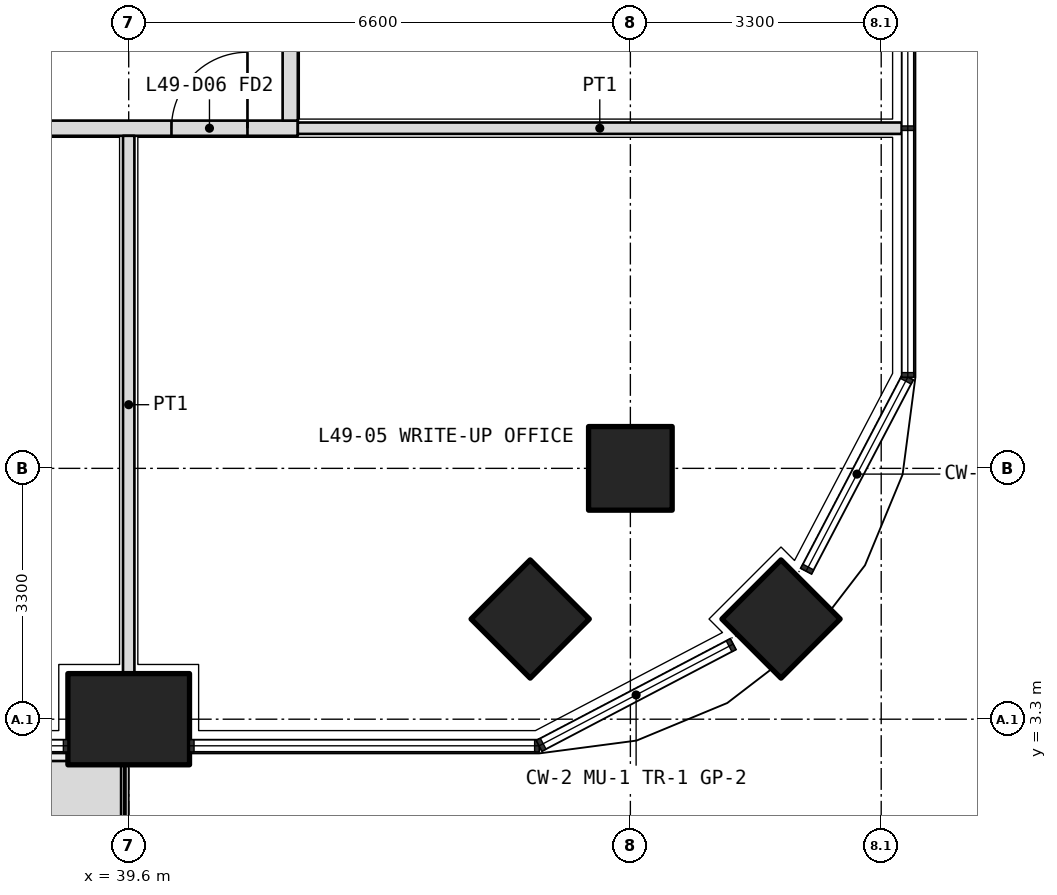
"""IFC4 building model, lengths in metres.
Left out: names, types, materials, properties, quantities, classifications, styles, units other than length and angle.
Written with IfcOpenShell. Run it as: python <this file> out.ifc"""

import sys

from ifc_helpers import new_model, si_unit, direction, frame, frame_2d, origin, origin_2d, place, context, subcontext, project, spatial, polyline, rectangle, outline, extrude, element, fill, save


model = new_model("IFC4")
c1 = context("Model", 3, precision=1e-05, world=origin(), true_north=direction((0.0, 1.0)))
c2 = subcontext(c1, "Body", "Model", "MODEL_VIEW")
j1 = project(units=[si_unit("LENGTHUNIT", "METRE"), si_unit("PLANEANGLEUNIT", "RADIAN")], contexts=[c1])
p1 = place(None, origin())
s1 = spatial("IfcSite", under=j1, at=p1, CompositionType="ELEMENT")
p2 = place(p1, origin())
s2 = spatial("IfcBuilding", under=s1, at=p2, CompositionType="ELEMENT")
p3 = place(p2, frame((0.0, 0.0, 214.5)))
s3 = spatial("IfcBuildingStorey", under=s2, at=p3, CompositionType="ELEMENT", Elevation=214.5)
p4 = place(p3, frame((48.182, 4.618, 0.0), z_axis=(0.0, 0.0, 1.0), x_axis=(0.707106781187, 0.707106781187, 0.0)))
e1 = element("IfcColumn", 1, at=p4, inside=s3, PredefinedType="COLUMN", context=c2, shape_type="SweptSolid", body=[
    extrude(rectangle(XDim=1.1, YDim=1.1, at=origin_2d()), origin(), (0.0, 0.0, 1.0), 4.2),
])
p5 = place(p3, frame((39.6, 3.3, 0.0), z_axis=(0.0, 0.0, 1.0), x_axis=(1.0, 0.0, 0.0)))
e2 = element("IfcColumn", 2, at=p5, inside=s3, PredefinedType="COLUMN", context=c2, shape_type="SweptSolid", body=[
    extrude(rectangle(XDim=1.6, YDim=1.2, at=origin_2d()), origin(), (0.0, 0.0, 1.0), 4.2),
])
for number, where, z_axis, x_axis in (
    (3, (46.2, 6.6, 0.0), (0.0, 0.0, 1.0), (1.0, 0.0, 0.0)),
    (4, (44.882, 4.618, 0.0), (0.0, 0.0, 1.0), (0.707, 0.707, 0.0)),
):
    element("IfcColumn", number, at=place(p3, frame(where, z_axis=z_axis, x_axis=x_axis)), inside=s3, PredefinedType="COLUMN", context=c2, shape_type="SweptSolid", body=[
        extrude(rectangle(XDim=1.1, YDim=1.1, at=origin_2d()), origin(), (0.0, 0.0, 1.0), 4.2),
    ])
p6 = place(p3, origin())
e5 = element("IfcWall", 5, at=p6, inside=s3, PredefinedType="USERDEFINED", context=c2, shape_type="SweptSolid", body=[
    extrude(outline(polyline([(30.45, 1.75), (39.5, 1.75), (39.5, 2.75), (30.45, 2.75), (30.45, 1.75)]), holes=[polyline([(30.6, 1.9), (39.35, 1.9), (39.35, 2.6), (30.6, 2.6), (30.6, 1.9)])]), origin(), (0.0, 0.0, 1.0), 1.05),
])
p7 = place(p3, frame((10.975, 11.075, 0.0), z_axis=(0.0, 0.0, 1.0), x_axis=(1.0, 0.0, 0.0)))
e6 = element("IfcWall", 6, at=p7, inside=s3, PredefinedType="PARTITIONING", context=c2, shape_type="SweptSolid", body=[
    extrude(rectangle(XDim=30.85, YDim=0.2, at=frame_2d((15.425, 0.0))), origin(), (0.0, 0.0, 1.0), 2.85),
])
p8 = place(p7, frame((2.312, 0.0, 0.0)))
e7 = element("IfcOpeningElement", 7, at=p8, cuts=e6, PredefinedType="OPENING", context=c2, shape_type="SweptSolid", body=[
    extrude(rectangle(XDim=1.0, YDim=2.1, at=frame_2d((0.5, 1.05))), frame((0.0, 0.11, 0.0), z_axis=(0.0, -1.0, 0.0), x_axis=(1.0, 0.0, 0.0)), (0.0, 0.0, 1.0), 0.22),
])
p9 = place(p7, frame((9.975, 0.0, 0.0)))
e8 = element("IfcOpeningElement", 8, at=p9, cuts=e6, PredefinedType="OPENING", context=c2, shape_type="SweptSolid", body=[
    extrude(rectangle(XDim=1.0, YDim=2.1, at=frame_2d((0.5, 1.05))), frame((0.0, 0.11, 0.0), z_axis=(0.0, -1.0, 0.0), x_axis=(1.0, 0.0, 0.0)), (0.0, 0.0, 1.0), 0.22),
])
p10 = place(p7, frame((16.575, 0.0, 0.0)))
e9 = element("IfcOpeningElement", 9, at=p10, cuts=e6, PredefinedType="OPENING", context=c2, shape_type="SweptSolid", body=[
    extrude(rectangle(XDim=1.0, YDim=2.1, at=frame_2d((0.5, 1.05))), frame((0.0, 0.11, 0.0), z_axis=(0.0, -1.0, 0.0), x_axis=(1.0, 0.0, 0.0)), (0.0, 0.0, 1.0), 0.22),
])
p11 = place(p7, frame((23.175, 0.0, 0.0)))
e10 = element("IfcOpeningElement", 10, at=p11, cuts=e6, PredefinedType="OPENING", context=c2, shape_type="SweptSolid", body=[
    extrude(rectangle(XDim=1.0, YDim=2.1, at=frame_2d((0.5, 1.05))), frame((0.0, 0.11, 0.0), z_axis=(0.0, -1.0, 0.0), x_axis=(1.0, 0.0, 0.0)), (0.0, 0.0, 1.0), 0.22),
])
p12 = place(p7, frame((29.188, 0.0, 0.0)))
e11 = element("IfcOpeningElement", 11, at=p12, cuts=e6, PredefinedType="OPENING", context=c2, shape_type="SweptSolid", body=[
    extrude(rectangle(XDim=1.0, YDim=2.1, at=frame_2d((0.5, 1.05))), frame((0.0, 0.11, 0.0), z_axis=(0.0, -1.0, 0.0), x_axis=(1.0, 0.0, 0.0)), (0.0, 0.0, 1.0), 0.22),
])
p13 = place(p3, frame((41.725, 11.175, 0.0), z_axis=(0.0, 0.0, 1.0), x_axis=(0.0, 1.0, 0.0)))
e12 = element("IfcWall", 12, at=p13, inside=s3, PredefinedType="PARTITIONING", context=c2, shape_type="SweptSolid", body=[
    extrude(rectangle(XDim=23.85, YDim=0.2, at=frame_2d((11.925, 0.0))), origin(), (0.0, 0.0, 1.0), 2.85),
])
p14 = place(p13, frame((3.762, 0.0, 0.0)))
e13 = element("IfcOpeningElement", 13, at=p14, cuts=e12, PredefinedType="OPENING", context=c2, shape_type="SweptSolid", body=[
    extrude(rectangle(XDim=1.0, YDim=2.1, at=frame_2d((0.5, 1.05))), frame((0.0, 0.11, 0.0), z_axis=(0.0, -1.0, 0.0), x_axis=(1.0, 0.0, 0.0)), (0.0, 0.0, 1.0), 0.22),
])
p15 = place(p13, frame((9.625, 0.0, 0.0)))
e14 = element("IfcOpeningElement", 14, at=p15, cuts=e12, PredefinedType="OPENING", context=c2, shape_type="SweptSolid", body=[
    extrude(rectangle(XDim=1.0, YDim=2.1, at=frame_2d((0.5, 1.05))), frame((0.0, 0.11, 0.0), z_axis=(0.0, -1.0, 0.0), x_axis=(1.0, 0.0, 0.0)), (0.0, 0.0, 1.0), 0.22),
])
p16 = place(p13, frame((12.975, 0.0, 0.0)))
e15 = element("IfcOpeningElement", 15, at=p16, cuts=e12, PredefinedType="OPENING", context=c2, shape_type="SweptSolid", body=[
    extrude(rectangle(XDim=0.9, YDim=2.1, at=frame_2d((0.45, 1.05))), frame((0.0, 0.11, 0.0), z_axis=(0.0, -1.0, 0.0), x_axis=(1.0, 0.0, 0.0)), (0.0, 0.0, 1.0), 0.22),
])
p17 = place(p13, frame((17.925, 0.0, 0.0)))
e16 = element("IfcOpeningElement", 16, at=p17, cuts=e12, PredefinedType="OPENING", context=c2, shape_type="SweptSolid", body=[
    extrude(rectangle(XDim=1.2, YDim=2.1, at=frame_2d((0.6, 1.05))), frame((0.0, 0.11, 0.0), z_axis=(0.0, -1.0, 0.0), x_axis=(1.0, 0.0, 0.0)), (0.0, 0.0, 1.0), 0.22),
])
p18 = place(p13, frame((22.387, 0.0, 0.0)))
e17 = element("IfcOpeningElement", 17, at=p18, cuts=e12, PredefinedType="OPENING", context=c2, shape_type="SweptSolid", body=[
    extrude(rectangle(XDim=1.0, YDim=2.1, at=frame_2d((0.5, 1.05))), frame((0.0, 0.11, 0.0), z_axis=(0.0, -1.0, 0.0), x_axis=(1.0, 0.0, 0.0)), (0.0, 0.0, 1.0), 0.22),
])
p19 = place(p3, frame((49.77, 11.075, 0.0), z_axis=(0.0, 0.0, 1.0), x_axis=(-1.0, 0.0, 0.0)))
e18 = element("IfcWall", 18, at=p19, inside=s3, PredefinedType="PARTITIONING", context=c2, shape_type="SweptSolid", body=[
    extrude(rectangle(XDim=7.945, YDim=0.15, at=frame_2d((3.973, 0.0))), origin(), (0.0, 0.0, 1.0), 2.6),
])
p20 = place(p3, frame((39.6, 3.9, 0.0), z_axis=(0.0, 0.0, 1.0), x_axis=(0.0, 1.0, 0.0)))
e19 = element("IfcWall", 19, at=p20, inside=s3, PredefinedType="PARTITIONING", context=c2, shape_type="SweptSolid", body=[
    extrude(rectangle(XDim=7.075, YDim=0.15, at=frame_2d((3.538, 0.0))), origin(), (0.0, 0.0, 1.0), 2.85),
])
p21 = place(p12, origin())
e20 = element("IfcDoor", 20, at=p21, inside=s3, OperationType="SINGLE_SWING_RIGHT", PredefinedType="DOOR", context=c2, shape_type="SweptSolid", body=[
    extrude(rectangle(XDim=1.0, YDim=2.1, at=frame_2d((0.5, 1.05))), frame((0.0, 0.025, 0.0), z_axis=(0.0, -1.0, 0.0), x_axis=(1.0, 0.0, 0.0)), (0.0, 0.0, 1.0), 0.05),
])
fill(e11, e20)
save(model, sys.argv[1])
